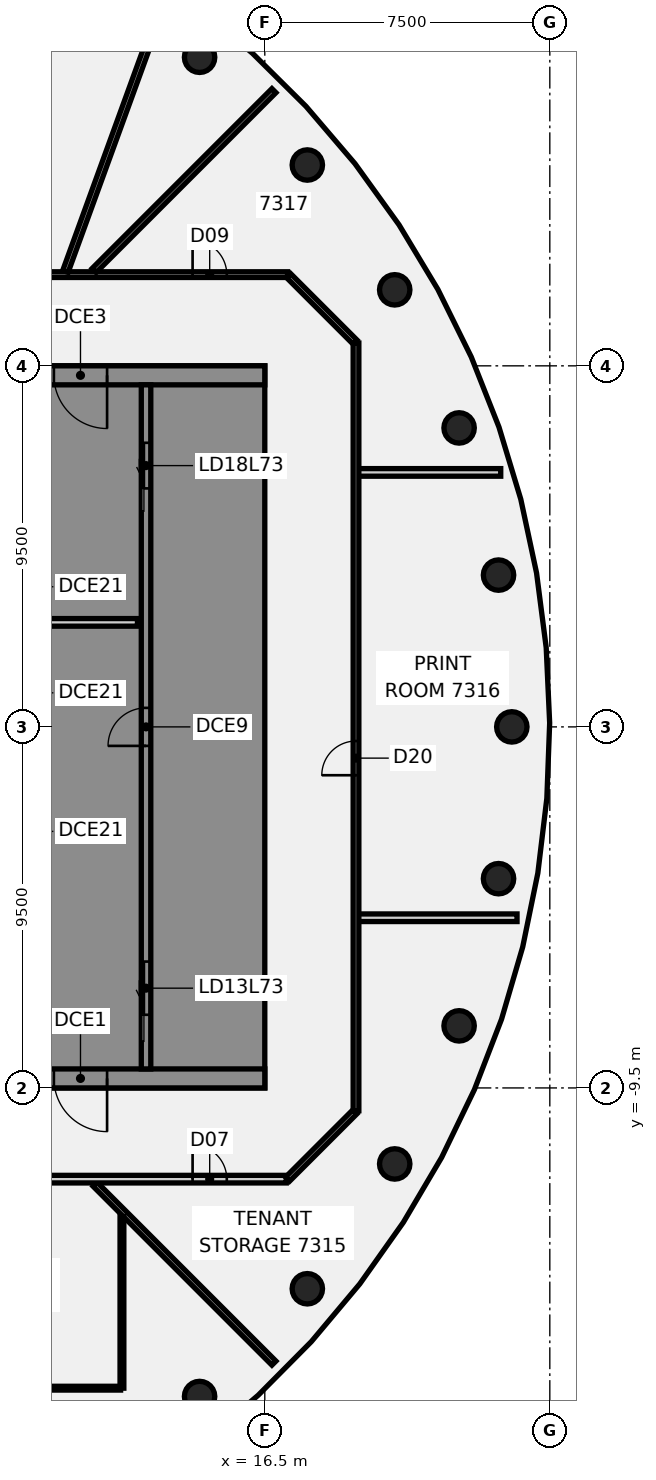
"""IFC4 building model, lengths in metres.
Left out: names, types, materials, properties, quantities, classifications, styles, units other than length and angle.
Written with IfcOpenShell. Run it as: python <this file> out.ifc"""

import sys

from ifc_helpers import new_model, si_unit, direction, frame, frame_2d, origin, origin_2d, place, context, subcontext, project, spatial, polyline, rectangle, circle, outline, extrude, element, fill, save


model = new_model("IFC4")
c1 = context("Model", 3, precision=1e-05, world=origin(), true_north=direction((0.0, 1.0)))
c2 = subcontext(c1, "Body", "Model", "MODEL_VIEW")
j1 = project(units=[si_unit("LENGTHUNIT", "METRE"), si_unit("PLANEANGLEUNIT", "RADIAN")], contexts=[c1])
p1 = place(None, origin())
s1 = spatial("IfcSite", under=j1, at=p1, CompositionType="ELEMENT")
p2 = place(p1, origin())
s2 = spatial("IfcBuilding", under=s1, at=p2, CompositionType="ELEMENT")
p3 = place(p2, frame((0.0, 0.0, 294.4)))
s3 = spatial("IfcBuildingStorey", under=s2, at=p3, CompositionType="ELEMENT", Elevation=294.4)
for number, where, z_axis, x_axis in (
    (1, (23.0, 0.0, -0.2), (0.0, 0.0, 1.0), (1.0, 0.0, 0.0)),
    (2, (22.651, 3.994, -0.2), (0.0, 0.0, 1.0), (1.0, 0.0, 0.0)),
    (3, (21.613, 7.866, -0.2), (0.0, 0.0, 1.0), (1.0, 0.0, 0.0)),
    (4, (19.919, 11.5, -0.2), (0.0, 0.0, 1.0), (1.0, 0.0, 0.0)),
    (5, (17.619, 14.784, -0.2), (0.0, 0.0, 1.0), (1.0, 0.0, 0.0)),
    (6, (14.784, 17.619, -0.2), (0.0, 0.0, 1.0), (1.0, 0.0, 0.0)),
    (7, (14.784, -17.619, -0.2), (0.0, 0.0, 1.0), (1.0, 0.0, 0.0)),
    (8, (17.619, -14.784, -0.2), (0.0, 0.0, 1.0), (1.0, 0.0, 0.0)),
    (9, (19.919, -11.5, -0.2), (0.0, 0.0, 1.0), (1.0, 0.0, 0.0)),
    (10, (21.613, -7.866, -0.2), (0.0, 0.0, 1.0), (1.0, 0.0, 0.0)),
    (11, (22.651, -3.994, -0.2), (0.0, 0.0, 1.0), (1.0, 0.0, 0.0)),
):
    element("IfcColumn", number, at=place(p3, frame(where, z_axis=z_axis, x_axis=x_axis)), inside=s3, PredefinedType="COLUMN", context=c2, shape_type="SweptSolid", body=[
        extrude(circle(Radius=0.4, at=origin_2d()), origin(), (0.0, 0.0, 1.0), 4.95),
    ])
p4 = place(p3, frame((12.034, -12.034, 0.0), z_axis=(0.0, 0.0, 1.0), x_axis=(0.707106781187, -0.707106781187, 0.0)))
e12 = element("IfcWall", 12, at=p4, inside=s3, PredefinedType="PARTITIONING", context=c2, shape_type="SweptSolid", body=[
    extrude(rectangle(XDim=6.655, YDim=0.15, at=frame_2d((3.328, 0.0))), origin(), (0.0, 0.0, 1.0), 4.05),
])
p5 = place(p3, frame((17.128, 11.872, 0.0), z_axis=(0.0, 0.0, 1.0), x_axis=(0.707106781187, -0.707106781187, 0.0)))
e13 = element("IfcWall", 13, at=p5, inside=s3, PredefinedType="PARTITIONING", context=c2, shape_type="SweptSolid", body=[
    extrude(rectangle(XDim=2.465, YDim=0.15, at=frame_2d((1.232, 0.0))), origin(), (0.0, 0.0, 1.0), 4.05),
])
p6 = place(p3, frame((-17.1, -11.9, 0.0), z_axis=(0.0, 0.0, 1.0), x_axis=(1.0, 0.0, 0.0)))
e14 = element("IfcWall", 14, at=p6, inside=s3, PredefinedType="PARTITIONING", context=c2, shape_type="SweptSolid", body=[
    extrude(rectangle(XDim=34.165, YDim=0.2, at=frame_2d((17.083, 0.0))), origin(), (0.0, 0.0, 1.0), 4.05),
])
p7 = place(p6, frame((7.75, 0.0, 0.0)))
e15 = element("IfcOpeningElement", 15, at=p7, cuts=e14, PredefinedType="OPENING", context=c2, shape_type="SweptSolid", body=[
    extrude(rectangle(XDim=0.9, YDim=2.1, at=frame_2d((0.45, 1.05))), frame((0.0, 0.11, 0.0), z_axis=(0.0, -1.0, 0.0), x_axis=(1.0, 0.0, 0.0)), (0.0, 0.0, 1.0), 0.22),
])
p8 = place(p6, frame((26.091, 0.0, 0.0)))
e16 = element("IfcOpeningElement", 16, at=p8, cuts=e14, PredefinedType="OPENING", context=c2, shape_type="SweptSolid", body=[
    extrude(rectangle(XDim=1.8, YDim=2.1, at=frame_2d((0.9, 1.05))), frame((0.0, 0.11, 0.0), z_axis=(0.0, -1.0, 0.0), x_axis=(1.0, 0.0, 0.0)), (0.0, 0.0, 1.0), 0.22),
])
p9 = place(p6, frame((17.709, 0.0, 0.0)))
e17 = element("IfcOpeningElement", 17, at=p9, cuts=e14, PredefinedType="OPENING", context=c2, shape_type="SweptSolid", body=[
    extrude(rectangle(XDim=1.8, YDim=2.1, at=frame_2d((0.9, 1.05))), frame((0.0, 0.11, 0.0), z_axis=(0.0, -1.0, 0.0), x_axis=(1.0, 0.0, 0.0)), (0.0, 0.0, 1.0), 0.22),
])
p10 = place(p6, frame((31.7, 0.0, 0.0)))
e18 = element("IfcOpeningElement", 18, at=p10, cuts=e14, PredefinedType="OPENING", context=c2, shape_type="SweptSolid", body=[
    extrude(rectangle(XDim=0.9, YDim=2.1, at=frame_2d((0.45, 1.05))), frame((0.0, 0.11, 0.0), z_axis=(0.0, -1.0, 0.0), x_axis=(1.0, 0.0, 0.0)), (0.0, 0.0, 1.0), 0.22),
])
p11 = place(p3, frame((-17.065, 11.9, 0.0), z_axis=(0.0, 0.0, 1.0), x_axis=(1.0, 0.0, 0.0)))
e19 = element("IfcWall", 19, at=p11, inside=s3, PredefinedType="PARTITIONING", context=c2, shape_type="SweptSolid", body=[
    extrude(rectangle(XDim=34.165, YDim=0.15, at=frame_2d((17.083, 0.0))), origin(), (0.0, 0.0, 1.0), 4.05),
])
p12 = place(p11, frame((24.544, 0.0, 0.0)))
e20 = element("IfcOpeningElement", 20, at=p12, cuts=e19, PredefinedType="OPENING", context=c2, shape_type="SweptSolid", body=[
    extrude(rectangle(XDim=1.8, YDim=2.1, at=frame_2d((0.9, 1.05))), frame((0.0, 0.085, 0.0), z_axis=(0.0, -1.0, 0.0), x_axis=(1.0, 0.0, 0.0)), (0.0, 0.0, 1.0), 0.17),
])
p13 = place(p11, frame((31.665, 0.0, 0.0)))
e21 = element("IfcOpeningElement", 21, at=p13, cuts=e19, PredefinedType="OPENING", context=c2, shape_type="SweptSolid", body=[
    extrude(rectangle(XDim=0.9, YDim=2.1, at=frame_2d((0.45, 1.05))), frame((0.0, 0.085, 0.0), z_axis=(0.0, -1.0, 0.0), x_axis=(1.0, 0.0, 0.0)), (0.0, 0.0, 1.0), 0.17),
])
p14 = place(p11, frame((10.565, 0.0, 0.0)))
e22 = element("IfcOpeningElement", 22, at=p14, cuts=e19, PredefinedType="OPENING", context=c2, shape_type="SweptSolid", body=[
    extrude(rectangle(XDim=1.8, YDim=2.1, at=frame_2d((0.9, 1.05))), frame((0.0, 0.085, 0.0), z_axis=(0.0, -1.0, 0.0), x_axis=(1.0, 0.0, 0.0)), (0.0, 0.0, 1.0), 0.17),
])
p15 = place(p3, frame((6.771, -17.4, 0.0), z_axis=(0.0, 0.0, 1.0), x_axis=(1.0, 0.0, 0.0)))
e23 = element("IfcWall", 23, at=p15, inside=s3, PredefinedType="PARTITIONING", context=c2, shape_type="SweptSolid", body=[
    extrude(rectangle(XDim=5.935, YDim=0.1, at=frame_2d((2.968, 0.0))), origin(), (0.0, 0.0, 1.0), 4.05),
])
p16 = place(p3, frame((18.955, -5.022, 0.0), z_axis=(0.0, 0.0, 1.0), x_axis=(1.0, 0.0, 0.0)))
e24 = element("IfcWall", 24, at=p16, inside=s3, PredefinedType="PARTITIONING", context=c2, shape_type="SweptSolid", body=[
    extrude(rectangle(XDim=4.182, YDim=0.2, at=frame_2d((2.091, 0.0))), origin(), (0.0, 0.0, 1.0), 4.05),
])
p17 = place(p3, frame((18.955, 6.696, 0.0), z_axis=(0.0, 0.0, 1.0), x_axis=(1.0, 0.0, 0.0)))
e25 = element("IfcWall", 25, at=p17, inside=s3, PredefinedType="PARTITIONING", context=c2, shape_type="SweptSolid", body=[
    extrude(rectangle(XDim=3.753, YDim=0.2, at=frame_2d((1.877, 0.0))), origin(), (0.0, 0.0, 1.0), 4.05),
])
p18 = place(p3, frame((12.01, 12.01, 0.0), z_axis=(0.0, 0.0, 1.0), x_axis=(0.707106781187, 0.707106781187, 0.0)))
e26 = element("IfcWall", 26, at=p18, inside=s3, PredefinedType="PARTITIONING", context=c2, shape_type="SweptSolid", body=[
    extrude(rectangle(XDim=6.691, YDim=0.15, at=frame_2d((3.345, 0.0))), origin(), (0.0, 0.0, 1.0), 4.05),
])
p19 = place(p3, frame((17.1, -11.9, 0.0), z_axis=(0.0, 0.0, 1.0), x_axis=(0.707106781187, 0.707106781187, 0.0)))
e27 = element("IfcWall", 27, at=p19, inside=s3, PredefinedType="PARTITIONING", context=c2, shape_type="SweptSolid", body=[
    extrude(rectangle(XDim=2.505, YDim=0.15, at=frame_2d((1.253, 0.0))), origin(), (0.0, 0.0, 1.0), 4.05),
])
p20 = place(p3, frame((11.254, 11.985, 0.0), z_axis=(0.0, 0.0, 1.0), x_axis=(0.341891443356, 0.939739453764, 0.0)))
e28 = element("IfcWall", 28, at=p20, inside=s3, PredefinedType="PARTITIONING", context=c2, shape_type="SweptSolid", body=[
    extrude(rectangle(XDim=7.662, YDim=0.15, at=frame_2d((3.831, 0.0))), origin(), (0.0, 0.0, 1.0), 4.05),
])
p21 = place(p3, frame((12.741, -17.4, 0.0), z_axis=(0.0, 0.0, 1.0), x_axis=(0.0, 1.0, 0.0)))
e29 = element("IfcWall", 29, at=p21, inside=s3, PredefinedType="PARTITIONING", context=c2, shape_type="SweptSolid", body=[
    extrude(rectangle(XDim=4.519, YDim=0.1, at=frame_2d((2.259, 0.0))), origin(), (0.0, 0.0, 1.0), 4.05),
])
p22 = place(p3, frame((18.9, -10.1, 0.0), z_axis=(0.0, 0.0, 1.0), x_axis=(0.0, 1.0, 0.0)))
e30 = element("IfcWall", 30, at=p22, inside=s3, PredefinedType="PARTITIONING", context=c2, shape_type="SweptSolid", body=[
    extrude(rectangle(XDim=20.2, YDim=0.15, at=frame_2d((10.1, 0.0))), origin(), (0.0, 0.0, 1.0), 4.05),
])
p23 = place(p22, frame((8.828, 0.0, 0.0)))
e31 = element("IfcOpeningElement", 31, at=p23, cuts=e30, PredefinedType="OPENING", context=c2, shape_type="SweptSolid", body=[
    extrude(rectangle(XDim=0.9, YDim=2.1, at=frame_2d((0.45, 1.05))), frame((0.0, 0.085, 0.0), z_axis=(0.0, -1.0, 0.0), x_axis=(1.0, 0.0, 0.0)), (0.0, 0.0, 1.0), 0.17),
])
p24 = place(p3, frame((16.5, -9.25, 0.0), z_axis=(0.0, 0.0, 1.0), x_axis=(-1.0, 0.0, 0.0)))
e32 = element("IfcWall", 32, at=p24, inside=s3, PredefinedType="SHEAR", context=c2, shape_type="SweptSolid", body=[
    extrude(rectangle(XDim=13.0, YDim=0.5, at=frame_2d((6.5, 0.0))), origin(), (0.0, 0.0, 1.0), 4.75),
])
p25 = place(p24, frame((4.15, 0.0, 0.0)))
e33 = element("IfcOpeningElement", 33, at=p25, cuts=e32, PredefinedType="OPENING", context=c2, shape_type="SweptSolid", body=[
    extrude(rectangle(XDim=1.4, YDim=2.1, at=frame_2d((0.7, 1.05))), frame((0.0, 0.26, 0.0), z_axis=(0.0, -1.0, 0.0), x_axis=(1.0, 0.0, 0.0)), (0.0, 0.0, 1.0), 0.52),
])
p26 = place(p24, frame((10.125, 0.0, 0.0)))
e34 = element("IfcOpeningElement", 34, at=p26, cuts=e32, PredefinedType="OPENING", context=c2, shape_type="SweptSolid", body=[
    extrude(rectangle(XDim=1.4, YDim=2.1, at=frame_2d((0.7, 1.05))), frame((0.0, 0.26, 0.0), z_axis=(0.0, -1.0, 0.0), x_axis=(1.0, 0.0, 0.0)), (0.0, 0.0, 1.0), 0.52),
])
p27 = place(p3, frame((16.5, 9.25, 0.0), z_axis=(0.0, 0.0, 1.0), x_axis=(-1.0, 0.0, 0.0)))
e35 = element("IfcWall", 35, at=p27, inside=s3, PredefinedType="SHEAR", context=c2, shape_type="SweptSolid", body=[
    extrude(rectangle(XDim=13.0, YDim=0.5, at=frame_2d((6.5, 0.0))), origin(), (0.0, 0.0, 1.0), 4.75),
])
p28 = place(p27, frame((4.15, 0.0, 0.0)))
e36 = element("IfcOpeningElement", 36, at=p28, cuts=e35, PredefinedType="OPENING", context=c2, shape_type="SweptSolid", body=[
    extrude(rectangle(XDim=1.4, YDim=2.1, at=frame_2d((0.7, 1.05))), frame((0.0, 0.26, 0.0), z_axis=(0.0, -1.0, 0.0), x_axis=(1.0, 0.0, 0.0)), (0.0, 0.0, 1.0), 0.52),
])
p29 = place(p3, frame((13.15, 2.75, 0.0), z_axis=(0.0, 0.0, 1.0), x_axis=(-1.0, 0.0, 0.0)))
e37 = element("IfcWall", 37, at=p29, inside=s3, PredefinedType="PARTITIONING", context=c2, shape_type="SweptSolid", body=[
    extrude(rectangle(XDim=3.0, YDim=0.2, at=frame_2d((1.5, 0.0))), origin(), (0.0, 0.0, 1.0), 4.75),
])
p30 = place(p3, origin())
e38 = element("IfcWall", 38, at=p30, inside=s3, PredefinedType="SHEAR", context=c2, shape_type="SweptSolid", body=[
    extrude(outline(polyline([(13.5, -8.125), (13.5, -9.0), (16.0, -9.0), (16.5, -9.0), (16.5, 9.0), (16.0, 9.0), (13.5, 9.0), (13.5, 8.125), (16.0, 8.125), (16.0, 5.625), (13.5, 5.625), (13.5, 5.375), (16.0, 5.375), (16.0, -5.375), (13.5, -5.375), (13.5, -5.625), (16.0, -5.625), (16.0, -8.125), (13.5, -8.125)])), origin(), (0.0, 0.0, 1.0), 4.75),
])
p31 = place(p3, frame((13.375, -9.0, 0.0), z_axis=(0.0, 0.0, 1.0), x_axis=(0.0, 1.0, 0.0)))
e39 = element("IfcWall", 39, at=p31, inside=s3, PredefinedType="SHEAR", context=c2, shape_type="SweptSolid", body=[
    extrude(rectangle(XDim=18.0, YDim=0.25, at=frame_2d((9.0, 0.0))), origin(), (0.0, 0.0, 1.0), 4.75),
])
p32 = place(p31, frame((1.425, 0.0, 0.0)))
e40 = element("IfcOpeningElement", 40, at=p32, cuts=e39, PredefinedType="OPENING", context=c2, shape_type="SweptSolid", body=[
    extrude(rectangle(XDim=1.4, YDim=2.1, at=frame_2d((0.7, 1.05))), frame((0.0, 0.135, 0.0), z_axis=(0.0, -1.0, 0.0), x_axis=(1.0, 0.0, 0.0)), (0.0, 0.0, 1.0), 0.27),
])
p33 = place(p31, frame((15.275, 0.0, 0.0)))
e41 = element("IfcOpeningElement", 41, at=p33, cuts=e39, PredefinedType="OPENING", context=c2, shape_type="SweptSolid", body=[
    extrude(rectangle(XDim=1.2, YDim=2.1, at=frame_2d((0.6, 1.05))), frame((0.0, 0.135, 0.0), z_axis=(0.0, -1.0, 0.0), x_axis=(1.0, 0.0, 0.0)), (0.0, 0.0, 1.0), 0.27),
])
p34 = place(p31, frame((8.5, 0.0, 0.0)))
e42 = element("IfcOpeningElement", 42, at=p34, cuts=e39, PredefinedType="OPENING", context=c2, shape_type="SweptSolid", body=[
    extrude(rectangle(XDim=1.0, YDim=2.1, at=frame_2d((0.5, 1.05))), frame((0.0, 0.135, 0.0), z_axis=(0.0, -1.0, 0.0), x_axis=(1.0, 0.0, 0.0)), (0.0, 0.0, 1.0), 0.27),
])
p35 = place(p10, frame((0.9, 0.0, 0.0), z_axis=(0.0, 0.0, 1.0), x_axis=(-1.0, 0.0, 0.0)))
e43 = element("IfcDoor", 43, at=p35, inside=s3, OperationType="SINGLE_SWING_RIGHT", PredefinedType="DOOR", context=c2, shape_type="SweptSolid", body=[
    extrude(rectangle(XDim=0.9, YDim=2.1, at=frame_2d((0.45, 1.05))), frame((0.0, 0.025, 0.0), z_axis=(0.0, -1.0, 0.0), x_axis=(1.0, 0.0, 0.0)), (0.0, 0.0, 1.0), 0.05),
])
fill(e18, e43)
p36 = place(p13, origin())
e44 = element("IfcDoor", 44, at=p36, inside=s3, OperationType="SINGLE_SWING_LEFT", PredefinedType="DOOR", context=c2, shape_type="SweptSolid", body=[
    extrude(rectangle(XDim=0.9, YDim=2.1, at=frame_2d((0.45, 1.05))), frame((0.0, 0.025, 0.0), z_axis=(0.0, -1.0, 0.0), x_axis=(1.0, 0.0, 0.0)), (0.0, 0.0, 1.0), 0.05),
])
fill(e21, e44)
p37 = place(p23, frame((0.9, 0.0, 0.0), z_axis=(0.0, 0.0, 1.0), x_axis=(-1.0, 0.0, 0.0)))
e45 = element("IfcDoor", 45, at=p37, inside=s3, OperationType="SINGLE_SWING_LEFT", PredefinedType="DOOR", context=c2, shape_type="SweptSolid", body=[
    extrude(rectangle(XDim=0.9, YDim=2.1, at=frame_2d((0.45, 1.05))), frame((0.0, 0.025, 0.0), z_axis=(0.0, -1.0, 0.0), x_axis=(1.0, 0.0, 0.0)), (0.0, 0.0, 1.0), 0.05),
])
fill(e31, e45)
p38 = place(p25, origin())
e46 = element("IfcDoor", 46, at=p38, inside=s3, OperationType="SINGLE_SWING_LEFT", PredefinedType="DOOR", context=c2, shape_type="SweptSolid", body=[
    extrude(rectangle(XDim=1.4, YDim=2.1, at=frame_2d((0.7, 1.05))), frame((0.0, 0.025, 0.0), z_axis=(0.0, -1.0, 0.0), x_axis=(1.0, 0.0, 0.0)), (0.0, 0.0, 1.0), 0.05),
])
fill(e33, e46)
p39 = place(p28, origin())
e47 = element("IfcDoor", 47, at=p39, inside=s3, OperationType="SINGLE_SWING_LEFT", PredefinedType="DOOR", context=c2, shape_type="SweptSolid", body=[
    extrude(rectangle(XDim=1.4, YDim=2.1, at=frame_2d((0.7, 1.05))), frame((0.0, 0.025, 0.0), z_axis=(0.0, -1.0, 0.0), x_axis=(1.0, 0.0, 0.0)), (0.0, 0.0, 1.0), 0.05),
])
fill(e36, e47)
p40 = place(p32, origin())
e48 = element("IfcDoor", 48, at=p40, inside=s3, OperationType="SLIDING_TO_LEFT", PredefinedType="DOOR", context=c2, shape_type="SweptSolid", body=[
    extrude(rectangle(XDim=1.4, YDim=2.1, at=frame_2d((0.7, 1.05))), frame((0.0, 0.025, 0.0), z_axis=(0.0, -1.0, 0.0), x_axis=(1.0, 0.0, 0.0)), (0.0, 0.0, 1.0), 0.05),
])
fill(e40, e48)
p41 = place(p33, origin())
e49 = element("IfcDoor", 49, at=p41, inside=s3, OperationType="SLIDING_TO_LEFT", PredefinedType="DOOR", context=c2, shape_type="SweptSolid", body=[
    extrude(rectangle(XDim=1.2, YDim=2.1, at=frame_2d((0.6, 1.05))), frame((0.0, 0.025, 0.0), z_axis=(0.0, -1.0, 0.0), x_axis=(1.0, 0.0, 0.0)), (0.0, 0.0, 1.0), 0.05),
])
fill(e41, e49)
p42 = place(p34, origin())
e50 = element("IfcDoor", 50, at=p42, inside=s3, OperationType="SINGLE_SWING_LEFT", PredefinedType="DOOR", context=c2, shape_type="SweptSolid", body=[
    extrude(rectangle(XDim=1.0, YDim=2.1, at=frame_2d((0.5, 1.05))), frame((0.0, 0.025, 0.0), z_axis=(0.0, -1.0, 0.0), x_axis=(1.0, 0.0, 0.0)), (0.0, 0.0, 1.0), 0.05),
])
fill(e42, e50)
save(model, sys.argv[1])
